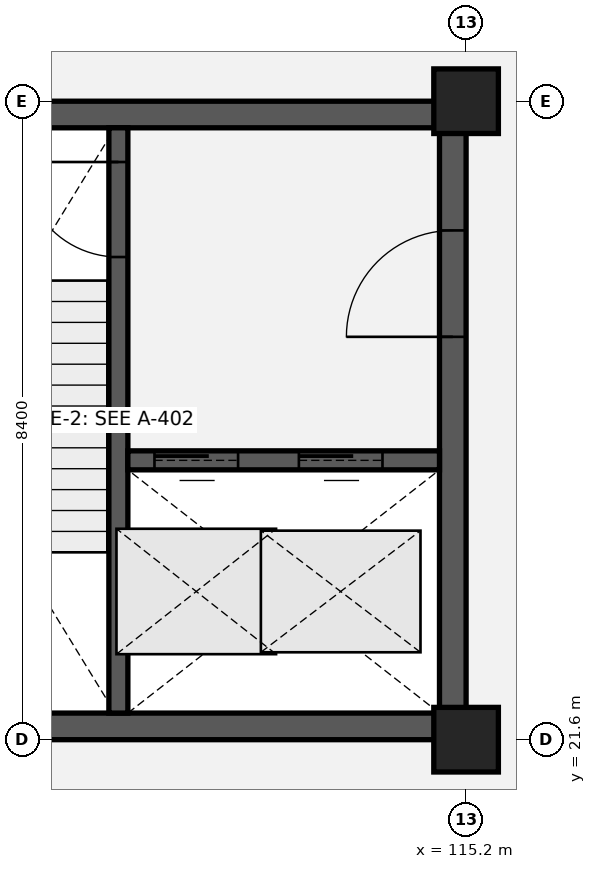
"""IFC4 building model, lengths in metres.
Left out: names, types, materials, properties, quantities, classifications, styles, units other than length and angle.
Written with IfcOpenShell. Run it as: python <this file> out.ifc"""

import sys

from ifc_helpers import new_model, si_unit, direction, frame, frame_2d, origin, origin_2d, place, context, subcontext, project, spatial, rectangle, extrude, element, fill, save


model = new_model("IFC4")
c1 = context("Model", 3, precision=1e-05, world=origin(), true_north=direction((0.0, 1.0)))
c2 = subcontext(c1, "Body", "Model", "MODEL_VIEW")
j1 = project(units=[si_unit("LENGTHUNIT", "METRE"), si_unit("PLANEANGLEUNIT", "RADIAN")], contexts=[c1])
p1 = place(None, origin())
s1 = spatial("IfcSite", under=j1, at=p1, CompositionType="ELEMENT")
p2 = place(p1, origin())
s2 = spatial("IfcBuilding", under=s1, at=p2, CompositionType="ELEMENT")
p3 = place(p2, frame((0.0, 0.0, 5.4)))
s3 = spatial("IfcBuildingStorey", under=s2, at=p3, CompositionType="ELEMENT", Elevation=5.4)
for number, where, z_axis, x_axis in (
    (1, (115.2, 21.6, 0.0), (0.0, 0.0, 1.0), (1.0, 0.0, 0.0)),
    (2, (115.2, 30.0, 0.0), (0.0, 0.0, 1.0), (1.0, 0.0, 0.0)),
):
    element("IfcColumn", number, at=place(p3, frame(where, z_axis=z_axis, x_axis=x_axis)), inside=s3, PredefinedType="COLUMN", context=c2, shape_type="SweptSolid", body=[
        extrude(rectangle(XDim=0.85, YDim=0.85, at=origin_2d()), origin(), (0.0, 0.0, 1.0), 4.8),
    ])
for number, where, z_axis, x_axis in (
    (3, (105.6, 29.825, 0.0), (0.0, 0.0, 1.0), (1.0, 0.0, 0.0)),
    (4, (105.6, 21.775, 0.0), (0.0, 0.0, 1.0), (1.0, 0.0, 0.0)),
):
    element("IfcWall", number, at=place(p3, frame(where, z_axis=z_axis, x_axis=x_axis)), inside=s3, PredefinedType="SHEAR", context=c2, shape_type="SweptSolid", body=[
        extrude(rectangle(XDim=9.6, YDim=0.35, at=frame_2d((4.8, 0.0))), origin(), (0.0, 0.0, 1.0), 4.48),
    ])
p4 = place(p3, frame((115.025, 21.6, 0.0), z_axis=(0.0, 0.0, 1.0), x_axis=(0.0, 1.0, 0.0)))
e5 = element("IfcWall", 5, at=p4, inside=s3, PredefinedType="SHEAR", context=c2, shape_type="SweptSolid", body=[
    extrude(rectangle(XDim=8.4, YDim=0.35, at=frame_2d((4.2, 0.0))), origin(), (0.0, 0.0, 1.0), 4.48),
])
p5 = place(p4, frame((5.3, 0.0, 0.0)))
e6 = element("IfcOpeningElement", 6, at=p5, cuts=e5, PredefinedType="OPENING", context=c2, shape_type="SweptSolid", body=[
    extrude(rectangle(XDim=1.4, YDim=2.15, at=frame_2d((0.7, 1.075))), frame((0.0, 0.185, 0.0), z_axis=(0.0, -1.0, 0.0), x_axis=(1.0, 0.0, 0.0)), (0.0, 0.0, 1.0), 0.37),
])
p6 = place(p3, frame((110.625, 29.65, 0.0), z_axis=(0.0, 0.0, 1.0), x_axis=(0.0, -1.0, 0.0)))
e7 = element("IfcWall", 7, at=p6, inside=s3, PredefinedType="SHEAR", context=c2, shape_type="SweptSolid", body=[
    extrude(rectangle(XDim=7.7, YDim=0.25, at=frame_2d((3.85, 0.0))), origin(), (0.0, 0.0, 1.0), 4.48),
])
p7 = place(p6, frame((0.45, 0.0, 0.0)))
e8 = element("IfcOpeningElement", 8, at=p7, cuts=e7, PredefinedType="OPENING", context=c2, shape_type="SweptSolid", body=[
    extrude(rectangle(XDim=1.25, YDim=2.15, at=frame_2d((0.625, 1.075))), frame((0.0, 0.135, 0.0), z_axis=(0.0, -1.0, 0.0), x_axis=(1.0, 0.0, 0.0)), (0.0, 0.0, 1.0), 0.27),
])
p8 = place(p3, frame((110.75, 25.275, 0.0), z_axis=(0.0, 0.0, 1.0), x_axis=(1.0, 0.0, 0.0)))
e9 = element("IfcWall", 9, at=p8, inside=s3, PredefinedType="SHEAR", context=c2, shape_type="SweptSolid", body=[
    extrude(rectangle(XDim=4.1, YDim=0.25, at=frame_2d((2.05, 0.0))), origin(), (0.0, 0.0, 1.0), 4.48),
])
p9 = place(p8, frame((0.35, 0.0, 0.0)))
e10 = element("IfcOpeningElement", 10, at=p9, cuts=e9, PredefinedType="OPENING", context=c2, shape_type="SweptSolid", body=[
    extrude(rectangle(XDim=1.1, YDim=2.15, at=frame_2d((0.55, 1.075))), frame((0.0, 0.135, 0.0), z_axis=(0.0, -1.0, 0.0), x_axis=(1.0, 0.0, 0.0)), (0.0, 0.0, 1.0), 0.27),
])
p10 = place(p8, frame((2.25, 0.0, 0.0)))
e11 = element("IfcOpeningElement", 11, at=p10, cuts=e9, PredefinedType="OPENING", context=c2, shape_type="SweptSolid", body=[
    extrude(rectangle(XDim=1.1, YDim=2.15, at=frame_2d((0.55, 1.075))), frame((0.0, 0.135, 0.0), z_axis=(0.0, -1.0, 0.0), x_axis=(1.0, 0.0, 0.0)), (0.0, 0.0, 1.0), 0.27),
])
p11 = place(p7, origin())
e12 = element("IfcDoor", 12, at=p11, inside=s3, OperationType="SINGLE_SWING_RIGHT", PredefinedType="DOOR", context=c2, shape_type="SweptSolid", body=[
    extrude(rectangle(XDim=1.25, YDim=2.15, at=frame_2d((0.625, 1.075))), frame((0.0, 0.025, 0.0), z_axis=(0.0, -1.0, 0.0), x_axis=(1.0, 0.0, 0.0)), (0.0, 0.0, 1.0), 0.05),
])
fill(e8, e12)
p12 = place(p9, origin())
e13 = element("IfcDoor", 13, at=p12, inside=s3, OperationType="SLIDING_TO_LEFT", PredefinedType="DOOR", context=c2, shape_type="SweptSolid", body=[
    extrude(rectangle(XDim=1.1, YDim=2.15, at=frame_2d((0.55, 1.075))), frame((0.0, 0.025, 0.0), z_axis=(0.0, -1.0, 0.0), x_axis=(1.0, 0.0, 0.0)), (0.0, 0.0, 1.0), 0.05),
])
fill(e10, e13)
p13 = place(p10, origin())
e14 = element("IfcDoor", 14, at=p13, inside=s3, OperationType="SLIDING_TO_LEFT", PredefinedType="DOOR", context=c2, shape_type="SweptSolid", body=[
    extrude(rectangle(XDim=1.1, YDim=2.15, at=frame_2d((0.55, 1.075))), frame((0.0, 0.025, 0.0), z_axis=(0.0, -1.0, 0.0), x_axis=(1.0, 0.0, 0.0)), (0.0, 0.0, 1.0), 0.05),
])
fill(e11, e14)
p14 = place(p5, origin())
e15 = element("IfcDoor", 15, at=p14, inside=s3, OperationType="SINGLE_SWING_LEFT", PredefinedType="DOOR", context=c2, shape_type="SweptSolid", body=[
    extrude(rectangle(XDim=1.4, YDim=2.15, at=frame_2d((0.7, 1.075))), frame((0.0, 0.025, 0.0), z_axis=(0.0, -1.0, 0.0), x_axis=(1.0, 0.0, 0.0)), (0.0, 0.0, 1.0), 0.05),
])
fill(e6, e15)
save(model, sys.argv[1])
